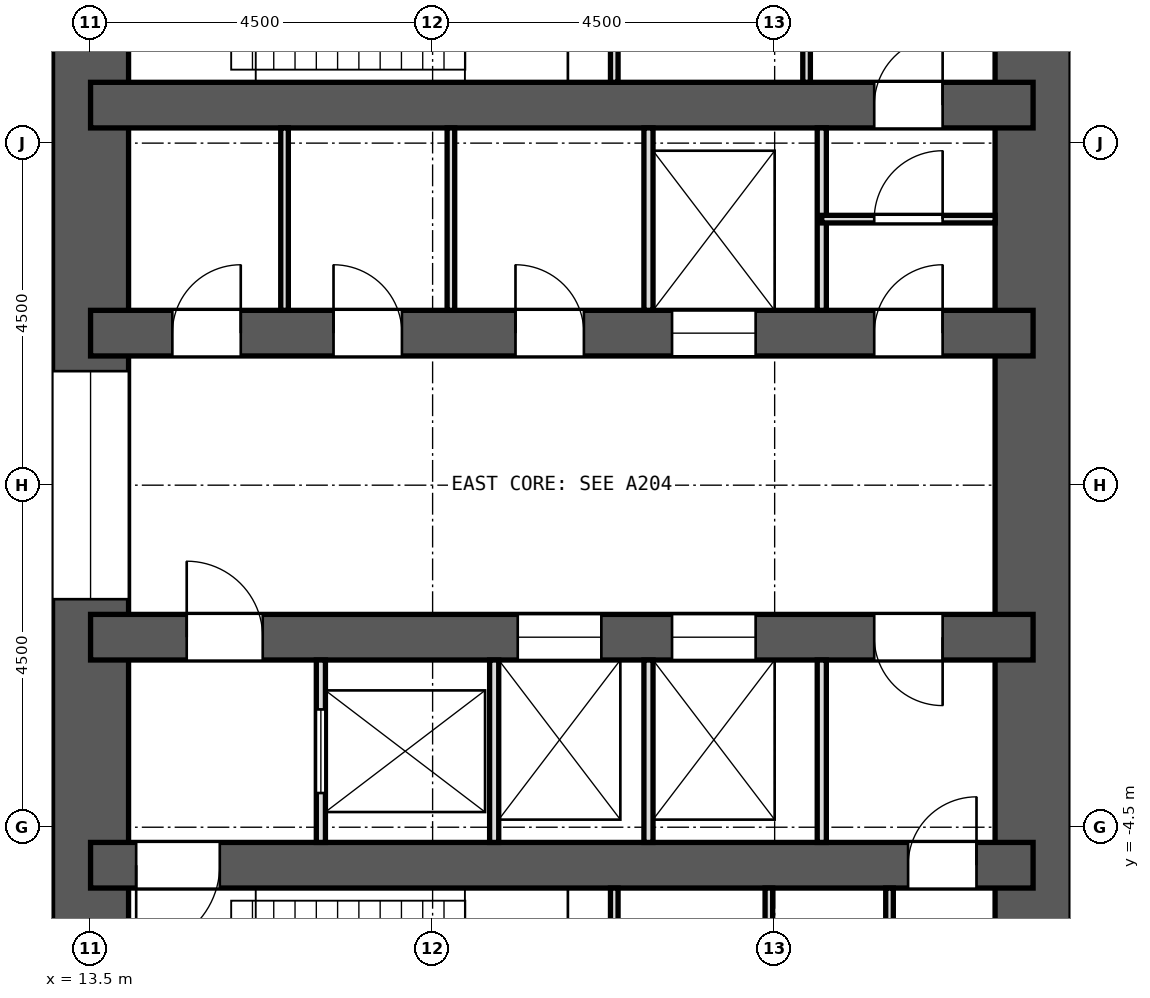
"""IFC4 building model, lengths in metres.
Left out: names, types, materials, properties, quantities, classifications, styles, units other than length and angle.
Written with IfcOpenShell. Run it as: python <this file> out.ifc"""

import sys

from ifc_helpers import new_model, si_unit, direction, frame, frame_2d, origin, place, context, subcontext, project, spatial, rectangle, extrude, element, fill, save


model = new_model("IFC4")
c1 = context("Model", 3, precision=1e-05, world=origin(), true_north=direction((0.0, 1.0)))
c2 = subcontext(c1, "Body", "Model", "MODEL_VIEW")
j1 = project(units=[si_unit("LENGTHUNIT", "METRE"), si_unit("PLANEANGLEUNIT", "RADIAN")], contexts=[c1])
p1 = place(None, origin())
s1 = spatial("IfcSite", under=j1, at=p1, CompositionType="ELEMENT")
p2 = place(p1, origin())
s2 = spatial("IfcBuilding", under=s1, at=p2, CompositionType="ELEMENT")
p3 = place(p2, frame((0.0, 0.0, 5.0)))
s3 = spatial("IfcBuildingStorey", under=s2, at=p3, CompositionType="ELEMENT", Elevation=5.0)
p4 = place(p3, frame((13.5, -9.0, 0.0), z_axis=(0.0, 0.0, 1.0), x_axis=(0.0, 1.0, 0.0)))
e1 = element("IfcWall", 1, at=p4, inside=s3, PredefinedType="SHEAR", context=c2, shape_type="SweptSolid", body=[
    extrude(rectangle(XDim=18.0, YDim=1.0, at=frame_2d((9.0, 0.0))), origin(), (0.0, 0.0, 1.0), 4.2),
])
p5 = place(p4, frame((15.4, 0.0, 0.0)))
e2 = element("IfcOpeningElement", 2, at=p5, cuts=e1, PredefinedType="OPENING", context=c2, shape_type="SweptSolid", body=[
    extrude(rectangle(XDim=1.2, YDim=2.1, at=frame_2d((0.6, 1.05))), frame((0.0, 0.512, 0.0), z_axis=(0.0, -1.0, 0.0), x_axis=(1.0, 0.0, 0.0)), (0.0, 0.0, 1.0), 1.024),
])
p6 = place(p4, frame((1.4, 0.0, 0.0)))
e3 = element("IfcOpeningElement", 3, at=p6, cuts=e1, PredefinedType="OPENING", context=c2, shape_type="SweptSolid", body=[
    extrude(rectangle(XDim=1.2, YDim=2.1, at=frame_2d((0.6, 1.05))), frame((0.0, 0.512, 0.0), z_axis=(0.0, -1.0, 0.0), x_axis=(1.0, 0.0, 0.0)), (0.0, 0.0, 1.0), 1.024),
])
p7 = place(p4, frame((7.5, 0.0, 0.0)))
e4 = element("IfcOpeningElement", 4, at=p7, cuts=e1, PredefinedType="OPENING", context=c2, shape_type="SweptSolid", body=[
    extrude(rectangle(XDim=3.0, YDim=2.4, at=frame_2d((1.5, 1.2))), frame((0.0, 0.512, 0.0), z_axis=(0.0, -1.0, 0.0), x_axis=(1.0, 0.0, 0.0)), (0.0, 0.0, 1.0), 1.024),
])
p8 = place(p3, frame((25.9, -9.0, 0.0), z_axis=(0.0, 0.0, 1.0), x_axis=(0.0, 1.0, 0.0)))
e5 = element("IfcWall", 5, at=p8, inside=s3, PredefinedType="SHEAR", context=c2, shape_type="SweptSolid", body=[
    extrude(rectangle(XDim=18.0, YDim=1.0, at=frame_2d((9.0, 0.0))), origin(), (0.0, 0.0, 1.0), 4.2),
])
p9 = place(p3, frame((13.5, 5.0, 0.0), z_axis=(0.0, 0.0, 1.0), x_axis=(1.0, 0.0, 0.0)))
e6 = element("IfcWall", 6, at=p9, inside=s3, PredefinedType="SHEAR", context=c2, shape_type="SweptSolid", body=[
    extrude(rectangle(XDim=12.4, YDim=0.6, at=frame_2d((6.2, 0.0))), origin(), (0.0, 0.0, 1.0), 4.2),
])
p10 = place(p9, frame((10.31, 0.0, 0.0)))
e7 = element("IfcOpeningElement", 7, at=p10, cuts=e6, PredefinedType="OPENING", context=c2, shape_type="SweptSolid", body=[
    extrude(rectangle(XDim=0.9, YDim=2.1, at=frame_2d((0.45, 1.05))), frame((0.0, 0.312, 0.0), z_axis=(0.0, -1.0, 0.0), x_axis=(1.0, 0.0, 0.0)), (0.0, 0.0, 1.0), 0.624),
])
p11 = place(p3, frame((13.5, -5.0, 0.0), z_axis=(0.0, 0.0, 1.0), x_axis=(1.0, 0.0, 0.0)))
e8 = element("IfcWall", 8, at=p11, inside=s3, PredefinedType="SHEAR", context=c2, shape_type="SweptSolid", body=[
    extrude(rectangle(XDim=12.4, YDim=0.6, at=frame_2d((6.2, 0.0))), origin(), (0.0, 0.0, 1.0), 4.2),
])
p12 = place(p11, frame((10.756, 0.0, 0.0)))
e9 = element("IfcOpeningElement", 9, at=p12, cuts=e8, PredefinedType="OPENING", context=c2, shape_type="SweptSolid", body=[
    extrude(rectangle(XDim=0.9, YDim=2.1, at=frame_2d((0.45, 1.05))), frame((0.0, 0.312, 0.0), z_axis=(0.0, -1.0, 0.0), x_axis=(1.0, 0.0, 0.0)), (0.0, 0.0, 1.0), 0.624),
])
p13 = place(p11, frame((0.6, 0.0, 0.0)))
e10 = element("IfcOpeningElement", 10, at=p13, cuts=e8, PredefinedType="OPENING", context=c2, shape_type="SweptSolid", body=[
    extrude(rectangle(XDim=1.1, YDim=2.1, at=frame_2d((0.55, 1.05))), frame((0.0, 0.312, 0.0), z_axis=(0.0, -1.0, 0.0), x_axis=(1.0, 0.0, 0.0)), (0.0, 0.0, 1.0), 0.624),
])
p14 = place(p3, frame((13.5, 2.0, 0.0), z_axis=(0.0, 0.0, 1.0), x_axis=(1.0, 0.0, 0.0)))
e11 = element("IfcWall", 11, at=p14, inside=s3, PredefinedType="SHEAR", context=c2, shape_type="SweptSolid", body=[
    extrude(rectangle(XDim=12.4, YDim=0.6, at=frame_2d((6.2, 0.0))), origin(), (0.0, 0.0, 1.0), 4.2),
])
p15 = place(p14, frame((7.65, 0.0, 0.0)))
e12 = element("IfcOpeningElement", 12, at=p15, cuts=e11, PredefinedType="OPENING", context=c2, shape_type="SweptSolid", body=[
    extrude(rectangle(XDim=1.1, YDim=2.1, at=frame_2d((0.55, 1.05))), frame((0.0, 0.312, 0.0), z_axis=(0.0, -1.0, 0.0), x_axis=(1.0, 0.0, 0.0)), (0.0, 0.0, 1.0), 0.624),
])
p16 = place(p14, frame((1.076, 0.0, 0.0)))
e13 = element("IfcOpeningElement", 13, at=p16, cuts=e11, PredefinedType="OPENING", context=c2, shape_type="SweptSolid", body=[
    extrude(rectangle(XDim=0.9, YDim=2.1, at=frame_2d((0.45, 1.05))), frame((0.0, 0.312, 0.0), z_axis=(0.0, -1.0, 0.0), x_axis=(1.0, 0.0, 0.0)), (0.0, 0.0, 1.0), 0.624),
])
p17 = place(p14, frame((3.196, 0.0, 0.0)))
e14 = element("IfcOpeningElement", 14, at=p17, cuts=e11, PredefinedType="OPENING", context=c2, shape_type="SweptSolid", body=[
    extrude(rectangle(XDim=0.9, YDim=2.1, at=frame_2d((0.45, 1.05))), frame((0.0, 0.312, 0.0), z_axis=(0.0, -1.0, 0.0), x_axis=(1.0, 0.0, 0.0)), (0.0, 0.0, 1.0), 0.624),
])
p18 = place(p14, frame((5.59, 0.0, 0.0)))
e15 = element("IfcOpeningElement", 15, at=p18, cuts=e11, PredefinedType="OPENING", context=c2, shape_type="SweptSolid", body=[
    extrude(rectangle(XDim=0.9, YDim=2.1, at=frame_2d((0.45, 1.05))), frame((0.0, 0.312, 0.0), z_axis=(0.0, -1.0, 0.0), x_axis=(1.0, 0.0, 0.0)), (0.0, 0.0, 1.0), 0.624),
])
p19 = place(p14, frame((10.31, 0.0, 0.0)))
e16 = element("IfcOpeningElement", 16, at=p19, cuts=e11, PredefinedType="OPENING", context=c2, shape_type="SweptSolid", body=[
    extrude(rectangle(XDim=0.9, YDim=2.1, at=frame_2d((0.45, 1.05))), frame((0.0, 0.312, 0.0), z_axis=(0.0, -1.0, 0.0), x_axis=(1.0, 0.0, 0.0)), (0.0, 0.0, 1.0), 0.624),
])
p20 = place(p3, frame((13.5, -2.0, 0.0), z_axis=(0.0, 0.0, 1.0), x_axis=(1.0, 0.0, 0.0)))
e17 = element("IfcWall", 17, at=p20, inside=s3, PredefinedType="SHEAR", context=c2, shape_type="SweptSolid", body=[
    extrude(rectangle(XDim=12.4, YDim=0.6, at=frame_2d((6.2, 0.0))), origin(), (0.0, 0.0, 1.0), 4.2),
])
p21 = place(p20, frame((5.62, 0.0, 0.0)))
e18 = element("IfcOpeningElement", 18, at=p21, cuts=e17, PredefinedType="OPENING", context=c2, shape_type="SweptSolid", body=[
    extrude(rectangle(XDim=1.1, YDim=2.1, at=frame_2d((0.55, 1.05))), frame((0.0, 0.312, 0.0), z_axis=(0.0, -1.0, 0.0), x_axis=(1.0, 0.0, 0.0)), (0.0, 0.0, 1.0), 0.624),
])
p22 = place(p20, frame((7.65, 0.0, 0.0)))
e19 = element("IfcOpeningElement", 19, at=p22, cuts=e17, PredefinedType="OPENING", context=c2, shape_type="SweptSolid", body=[
    extrude(rectangle(XDim=1.1, YDim=2.1, at=frame_2d((0.55, 1.05))), frame((0.0, 0.312, 0.0), z_axis=(0.0, -1.0, 0.0), x_axis=(1.0, 0.0, 0.0)), (0.0, 0.0, 1.0), 0.624),
])
p23 = place(p20, frame((1.265, 0.0, 0.0)))
e20 = element("IfcOpeningElement", 20, at=p23, cuts=e17, PredefinedType="OPENING", context=c2, shape_type="SweptSolid", body=[
    extrude(rectangle(XDim=1.0, YDim=2.1, at=frame_2d((0.5, 1.05))), frame((0.0, 0.312, 0.0), z_axis=(0.0, -1.0, 0.0), x_axis=(1.0, 0.0, 0.0)), (0.0, 0.0, 1.0), 0.624),
])
p24 = place(p20, frame((10.31, 0.0, 0.0)))
e21 = element("IfcOpeningElement", 21, at=p24, cuts=e17, PredefinedType="OPENING", context=c2, shape_type="SweptSolid", body=[
    extrude(rectangle(XDim=0.9, YDim=2.1, at=frame_2d((0.45, 1.05))), frame((0.0, 0.312, 0.0), z_axis=(0.0, -1.0, 0.0), x_axis=(1.0, 0.0, 0.0)), (0.0, 0.0, 1.0), 0.624),
])
for number, where, z_axis, x_axis in (
    (22, (16.052, 2.3, 0.0), (0.0, 0.0, 1.0), (0.0, 1.0, 0.0)),
    (23, (18.241, 2.3, 0.0), (0.0, 0.0, 1.0), (0.0, 1.0, 0.0)),
):
    element("IfcWall", number, at=place(p3, frame(where, z_axis=z_axis, x_axis=x_axis)), inside=s3, PredefinedType="PARTITIONING", context=c2, shape_type="SweptSolid", body=[
        extrude(rectangle(XDim=2.4, YDim=0.1, at=frame_2d((1.2, 0.0))), origin(), (0.0, 0.0, 1.0), 3.65),
    ])
for number, where, z_axis, x_axis in (
    (24, (20.84, 2.3, 0.0), (0.0, 0.0, 1.0), (0.0, 1.0, 0.0)),
    (25, (23.12, 2.3, 0.0), (0.0, 0.0, 1.0), (0.0, 1.0, 0.0)),
):
    element("IfcWall", number, at=place(p3, frame(where, z_axis=z_axis, x_axis=x_axis)), inside=s3, PredefinedType="PARTITIONING", context=c2, shape_type="SweptSolid", body=[
        extrude(rectangle(XDim=2.4, YDim=0.12, at=frame_2d((1.2, 0.0))), origin(), (0.0, 0.0, 1.0), 3.65),
    ])
p25 = place(p3, frame((16.53, -4.7, 0.0), z_axis=(0.0, 0.0, 1.0), x_axis=(0.0, 1.0, 0.0)))
e26 = element("IfcWall", 26, at=p25, inside=s3, PredefinedType="PARTITIONING", context=c2, shape_type="SweptSolid", body=[
    extrude(rectangle(XDim=2.4, YDim=0.12, at=frame_2d((1.2, 0.0))), origin(), (0.0, 0.0, 1.0), 3.65),
])
p26 = place(p25, frame((0.65, 0.0, 0.0)))
e27 = element("IfcOpeningElement", 27, at=p26, cuts=e26, PredefinedType="OPENING", context=c2, shape_type="SweptSolid", body=[
    extrude(rectangle(XDim=1.1, YDim=2.1, at=frame_2d((0.55, 1.05))), frame((0.0, 0.072, 0.0), z_axis=(0.0, -1.0, 0.0), x_axis=(1.0, 0.0, 0.0)), (0.0, 0.0, 1.0), 0.144),
])
for number, where, z_axis, x_axis in (
    (28, (18.81, -4.7, 0.0), (0.0, 0.0, 1.0), (0.0, 1.0, 0.0)),
    (29, (20.84, -4.7, 0.0), (0.0, 0.0, 1.0), (0.0, 1.0, 0.0)),
    (30, (23.12, -4.7, 0.0), (0.0, 0.0, 1.0), (0.0, 1.0, 0.0)),
):
    element("IfcWall", number, at=place(p3, frame(where, z_axis=z_axis, x_axis=x_axis)), inside=s3, PredefinedType="PARTITIONING", context=c2, shape_type="SweptSolid", body=[
        extrude(rectangle(XDim=2.4, YDim=0.12, at=frame_2d((1.2, 0.0))), origin(), (0.0, 0.0, 1.0), 3.65),
    ])
p27 = place(p3, frame((23.12, 3.5, 0.0), z_axis=(0.0, 0.0, 1.0), x_axis=(1.0, 0.0, 0.0)))
e31 = element("IfcWall", 31, at=p27, inside=s3, PredefinedType="PARTITIONING", context=c2, shape_type="SweptSolid", body=[
    extrude(rectangle(XDim=2.28, YDim=0.1, at=frame_2d((1.14, 0.0))), origin(), (0.0, 0.0, 1.0), 3.65),
])
p28 = place(p27, frame((0.69, 0.0, 0.0)))
e32 = element("IfcOpeningElement", 32, at=p28, cuts=e31, PredefinedType="OPENING", context=c2, shape_type="SweptSolid", body=[
    extrude(rectangle(XDim=0.9, YDim=2.1, at=frame_2d((0.45, 1.05))), frame((0.0, 0.062, 0.0), z_axis=(0.0, -1.0, 0.0), x_axis=(1.0, 0.0, 0.0)), (0.0, 0.0, 1.0), 0.124),
])
p29 = place(p3, frame((20.39, 5.3, 0.0), z_axis=(0.0, 0.0, 1.0), x_axis=(0.0, 1.0, 0.0)))
e33 = element("IfcWall", 33, at=p29, inside=s3, PredefinedType="PARTITIONING", context=c2, shape_type="SweptSolid", body=[
    extrude(rectangle(XDim=3.2, YDim=0.1, at=frame_2d((1.6, 0.0))), origin(), (0.0, 0.0, 1.0), 3.65),
])
p30 = place(p3, frame((22.92, 5.3, 0.0), z_axis=(0.0, 0.0, 1.0), x_axis=(0.0, 1.0, 0.0)))
e34 = element("IfcWall", 34, at=p30, inside=s3, PredefinedType="PARTITIONING", context=c2, shape_type="SweptSolid", body=[
    extrude(rectangle(XDim=3.2, YDim=0.1, at=frame_2d((1.6, 0.0))), origin(), (0.0, 0.0, 1.0), 3.65),
])
p31 = place(p30, frame((1.15, 0.0, 0.0)))
e35 = element("IfcOpeningElement", 35, at=p31, cuts=e34, PredefinedType="OPENING", context=c2, shape_type="SweptSolid", body=[
    extrude(rectangle(XDim=0.9, YDim=2.1, at=frame_2d((0.45, 1.05))), frame((0.0, 0.062, 0.0), z_axis=(0.0, -1.0, 0.0), x_axis=(1.0, 0.0, 0.0)), (0.0, 0.0, 1.0), 0.124),
])
p32 = place(p3, frame((20.39, -8.5, 0.0), z_axis=(0.0, 0.0, 1.0), x_axis=(0.0, 1.0, 0.0)))
e36 = element("IfcWall", 36, at=p32, inside=s3, PredefinedType="PARTITIONING", context=c2, shape_type="SweptSolid", body=[
    extrude(rectangle(XDim=3.2, YDim=0.1, at=frame_2d((1.6, 0.0))), origin(), (0.0, 0.0, 1.0), 3.65),
])
p33 = place(p3, frame((22.424, -8.5, 0.0), z_axis=(0.0, 0.0, 1.0), x_axis=(0.0, 1.0, 0.0)))
e37 = element("IfcWall", 37, at=p33, inside=s3, PredefinedType="PARTITIONING", context=c2, shape_type="SweptSolid", body=[
    extrude(rectangle(XDim=3.2, YDim=0.1, at=frame_2d((1.6, 0.0))), origin(), (0.0, 0.0, 1.0), 3.65),
])
p34 = place(p33, frame((1.15, 0.0, 0.0)))
e38 = element("IfcOpeningElement", 38, at=p34, cuts=e37, PredefinedType="OPENING", context=c2, shape_type="SweptSolid", body=[
    extrude(rectangle(XDim=0.9, YDim=2.1, at=frame_2d((0.45, 1.05))), frame((0.0, 0.062, 0.0), z_axis=(0.0, -1.0, 0.0), x_axis=(1.0, 0.0, 0.0)), (0.0, 0.0, 1.0), 0.124),
])
p35 = place(p3, frame((24.011, -8.5, 0.0), z_axis=(0.0, 0.0, 1.0), x_axis=(0.0, 1.0, 0.0)))
e39 = element("IfcWall", 39, at=p35, inside=s3, PredefinedType="PARTITIONING", context=c2, shape_type="SweptSolid", body=[
    extrude(rectangle(XDim=3.2, YDim=0.1, at=frame_2d((1.6, 0.0))), origin(), (0.0, 0.0, 1.0), 3.65),
])
p36 = place(p35, frame((1.15, 0.0, 0.0)))
e40 = element("IfcOpeningElement", 40, at=p36, cuts=e39, PredefinedType="OPENING", context=c2, shape_type="SweptSolid", body=[
    extrude(rectangle(XDim=0.9, YDim=2.1, at=frame_2d((0.45, 1.05))), frame((0.0, 0.062, 0.0), z_axis=(0.0, -1.0, 0.0), x_axis=(1.0, 0.0, 0.0)), (0.0, 0.0, 1.0), 0.124),
])
p37 = place(p15, origin())
e41 = element("IfcDoor", 41, at=p37, inside=s3, OperationType="DOUBLE_DOOR_SLIDING", PredefinedType="DOOR", context=c2, shape_type="SweptSolid", body=[
    extrude(rectangle(XDim=1.1, YDim=2.1, at=frame_2d((0.55, 1.05))), frame((0.0, 0.025, 0.0), z_axis=(0.0, -1.0, 0.0), x_axis=(1.0, 0.0, 0.0)), (0.0, 0.0, 1.0), 0.05),
])
fill(e12, e41)
p38 = place(p26, origin())
e42 = element("IfcDoor", 42, at=p38, inside=s3, OperationType="DOUBLE_DOOR_SLIDING", PredefinedType="DOOR", context=c2, shape_type="SweptSolid", body=[
    extrude(rectangle(XDim=1.1, YDim=2.1, at=frame_2d((0.55, 1.05))), frame((0.0, 0.025, 0.0), z_axis=(0.0, -1.0, 0.0), x_axis=(1.0, 0.0, 0.0)), (0.0, 0.0, 1.0), 0.05),
])
fill(e27, e42)
p39 = place(p21, origin())
e43 = element("IfcDoor", 43, at=p39, inside=s3, OperationType="DOUBLE_DOOR_SLIDING", PredefinedType="DOOR", context=c2, shape_type="SweptSolid", body=[
    extrude(rectangle(XDim=1.1, YDim=2.1, at=frame_2d((0.55, 1.05))), frame((0.0, 0.025, 0.0), z_axis=(0.0, -1.0, 0.0), x_axis=(1.0, 0.0, 0.0)), (0.0, 0.0, 1.0), 0.05),
])
fill(e18, e43)
p40 = place(p22, origin())
e44 = element("IfcDoor", 44, at=p40, inside=s3, OperationType="DOUBLE_DOOR_SLIDING", PredefinedType="DOOR", context=c2, shape_type="SweptSolid", body=[
    extrude(rectangle(XDim=1.1, YDim=2.1, at=frame_2d((0.55, 1.05))), frame((0.0, 0.025, 0.0), z_axis=(0.0, -1.0, 0.0), x_axis=(1.0, 0.0, 0.0)), (0.0, 0.0, 1.0), 0.05),
])
fill(e19, e44)
p41 = place(p16, origin())
e45 = element("IfcDoor", 45, at=p41, inside=s3, OperationType="SINGLE_SWING_RIGHT", PredefinedType="DOOR", context=c2, shape_type="SweptSolid", body=[
    extrude(rectangle(XDim=0.9, YDim=2.1, at=frame_2d((0.45, 1.05))), frame((0.0, 0.025, 0.0), z_axis=(0.0, -1.0, 0.0), x_axis=(1.0, 0.0, 0.0)), (0.0, 0.0, 1.0), 0.05),
])
fill(e13, e45)
p42 = place(p17, origin())
e46 = element("IfcDoor", 46, at=p42, inside=s3, OperationType="SINGLE_SWING_LEFT", PredefinedType="DOOR", context=c2, shape_type="SweptSolid", body=[
    extrude(rectangle(XDim=0.9, YDim=2.1, at=frame_2d((0.45, 1.05))), frame((0.0, 0.025, 0.0), z_axis=(0.0, -1.0, 0.0), x_axis=(1.0, 0.0, 0.0)), (0.0, 0.0, 1.0), 0.05),
])
fill(e14, e46)
p43 = place(p18, origin())
e47 = element("IfcDoor", 47, at=p43, inside=s3, OperationType="SINGLE_SWING_LEFT", PredefinedType="DOOR", context=c2, shape_type="SweptSolid", body=[
    extrude(rectangle(XDim=0.9, YDim=2.1, at=frame_2d((0.45, 1.05))), frame((0.0, 0.025, 0.0), z_axis=(0.0, -1.0, 0.0), x_axis=(1.0, 0.0, 0.0)), (0.0, 0.0, 1.0), 0.05),
])
fill(e15, e47)
p44 = place(p19, origin())
e48 = element("IfcDoor", 48, at=p44, inside=s3, OperationType="SINGLE_SWING_RIGHT", PredefinedType="DOOR", context=c2, shape_type="SweptSolid", body=[
    extrude(rectangle(XDim=0.9, YDim=2.1, at=frame_2d((0.45, 1.05))), frame((0.0, 0.025, 0.0), z_axis=(0.0, -1.0, 0.0), x_axis=(1.0, 0.0, 0.0)), (0.0, 0.0, 1.0), 0.05),
])
fill(e16, e48)
p45 = place(p23, origin())
e49 = element("IfcDoor", 49, at=p45, inside=s3, OperationType="SINGLE_SWING_LEFT", PredefinedType="DOOR", context=c2, shape_type="SweptSolid", body=[
    extrude(rectangle(XDim=1.0, YDim=2.1, at=frame_2d((0.5, 1.05))), frame((0.0, 0.025, 0.0), z_axis=(0.0, -1.0, 0.0), x_axis=(1.0, 0.0, 0.0)), (0.0, 0.0, 1.0), 0.05),
])
fill(e20, e49)
p46 = place(p24, frame((0.9, 0.0, 0.0), z_axis=(0.0, 0.0, 1.0), x_axis=(-1.0, 0.0, 0.0)))
e50 = element("IfcDoor", 50, at=p46, inside=s3, OperationType="SINGLE_SWING_LEFT", PredefinedType="DOOR", context=c2, shape_type="SweptSolid", body=[
    extrude(rectangle(XDim=0.9, YDim=2.1, at=frame_2d((0.45, 1.05))), frame((0.0, 0.025, 0.0), z_axis=(0.0, -1.0, 0.0), x_axis=(1.0, 0.0, 0.0)), (0.0, 0.0, 1.0), 0.05),
])
fill(e21, e50)
p47 = place(p28, origin())
e51 = element("IfcDoor", 51, at=p47, inside=s3, OperationType="SINGLE_SWING_RIGHT", PredefinedType="DOOR", context=c2, shape_type="SweptSolid", body=[
    extrude(rectangle(XDim=0.9, YDim=2.1, at=frame_2d((0.45, 1.05))), frame((0.0, 0.025, 0.0), z_axis=(0.0, -1.0, 0.0), x_axis=(1.0, 0.0, 0.0)), (0.0, 0.0, 1.0), 0.05),
])
fill(e32, e51)
p48 = place(p10, origin())
e52 = element("IfcDoor", 52, at=p48, inside=s3, OperationType="SINGLE_SWING_RIGHT", PredefinedType="DOOR", context=c2, shape_type="SweptSolid", body=[
    extrude(rectangle(XDim=0.9, YDim=2.1, at=frame_2d((0.45, 1.05))), frame((0.0, 0.025, 0.0), z_axis=(0.0, -1.0, 0.0), x_axis=(1.0, 0.0, 0.0)), (0.0, 0.0, 1.0), 0.05),
])
fill(e7, e52)
p49 = place(p12, origin())
e53 = element("IfcDoor", 53, at=p49, inside=s3, OperationType="SINGLE_SWING_RIGHT", PredefinedType="DOOR", context=c2, shape_type="SweptSolid", body=[
    extrude(rectangle(XDim=0.9, YDim=2.1, at=frame_2d((0.45, 1.05))), frame((0.0, 0.025, 0.0), z_axis=(0.0, -1.0, 0.0), x_axis=(1.0, 0.0, 0.0)), (0.0, 0.0, 1.0), 0.05),
])
fill(e9, e53)
p50 = place(p13, frame((1.1, 0.0, 0.0), z_axis=(0.0, 0.0, 1.0), x_axis=(-1.0, 0.0, 0.0)))
e54 = element("IfcDoor", 54, at=p50, inside=s3, OperationType="SINGLE_SWING_RIGHT", PredefinedType="DOOR", context=c2, shape_type="SweptSolid", body=[
    extrude(rectangle(XDim=1.1, YDim=2.1, at=frame_2d((0.55, 1.05))), frame((0.0, 0.025, 0.0), z_axis=(0.0, -1.0, 0.0), x_axis=(1.0, 0.0, 0.0)), (0.0, 0.0, 1.0), 0.05),
])
fill(e10, e54)
p51 = place(p7, origin())
e55 = element("IfcDoor", 55, at=p51, inside=s3, OperationType="DOUBLE_DOOR_SLIDING", PredefinedType="DOOR", context=c2, shape_type="SweptSolid", body=[
    extrude(rectangle(XDim=3.0, YDim=2.4, at=frame_2d((1.5, 1.2))), frame((0.0, 0.025, 0.0), z_axis=(0.0, -1.0, 0.0), x_axis=(1.0, 0.0, 0.0)), (0.0, 0.0, 1.0), 0.05),
])
fill(e4, e55)
save(model, sys.argv[1])
